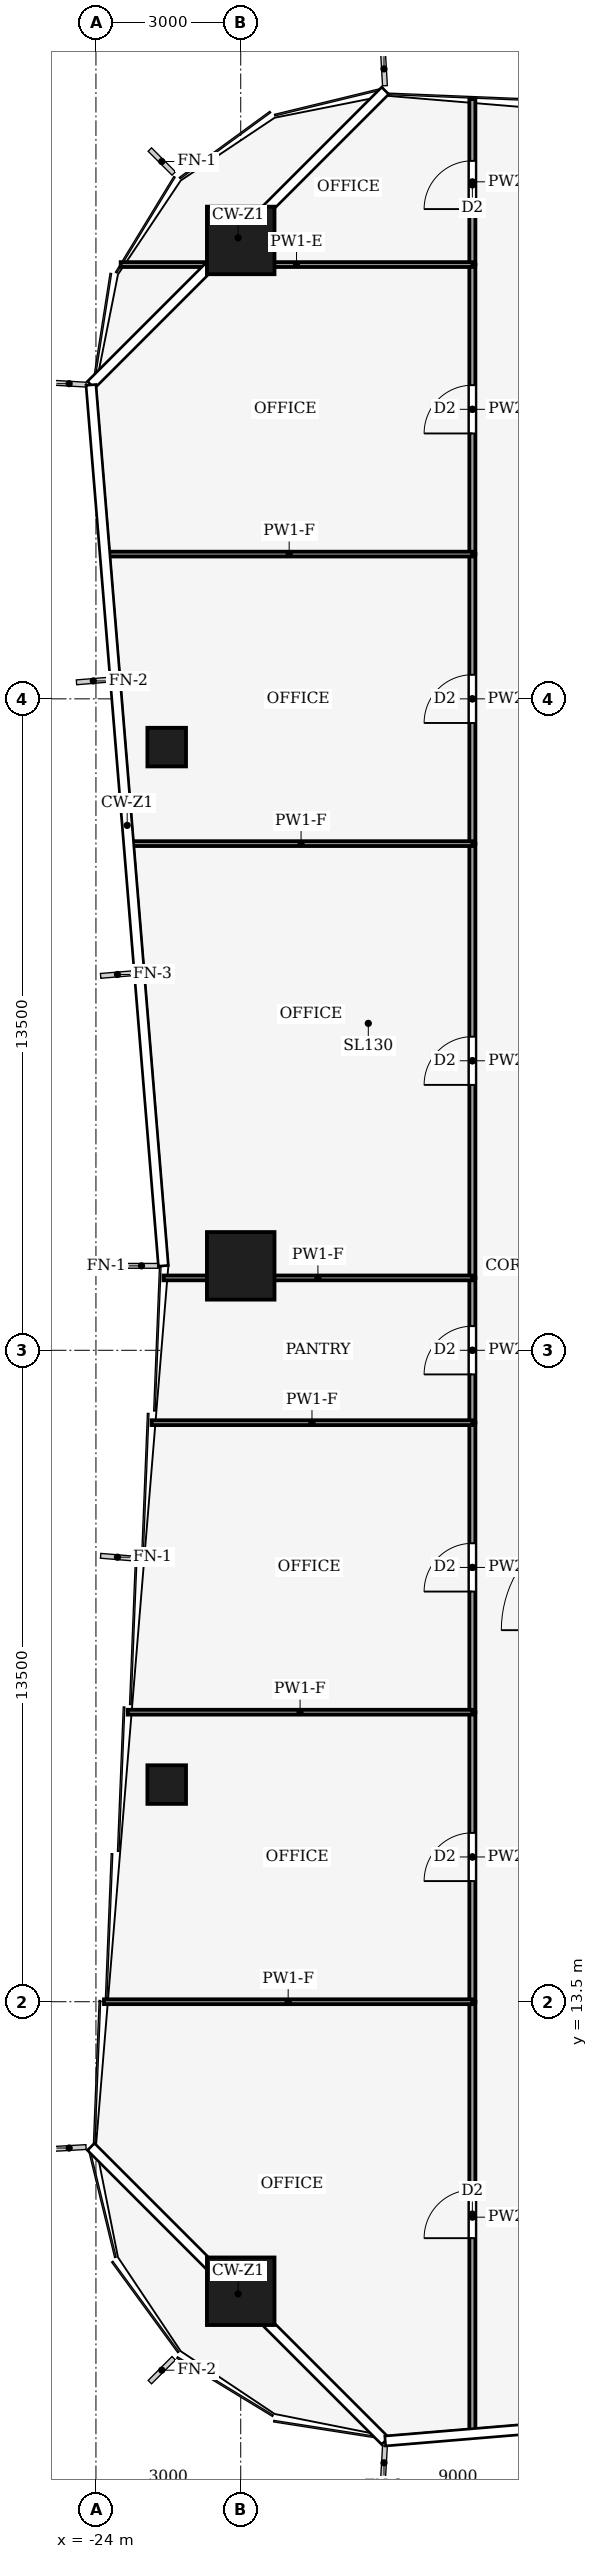
"""IFC4 building model, lengths in metres.
Left out: names, types, materials, properties, quantities, classifications, styles, units other than length and angle.
Written with IfcOpenShell. Run it as: python <this file> out.ifc"""

import sys

from ifc_helpers import new_model, si_unit, direction, frame, frame_2d, origin, origin_2d, place, context, subcontext, project, spatial, rectangle, hollow_rectangle, extrude, element, fill, save


model = new_model("IFC4")
c1 = context("Model", 3, precision=1e-05, world=origin(), true_north=direction((0.0, 1.0)))
c2 = subcontext(c1, "Body", "Model", "MODEL_VIEW")
j1 = project(units=[si_unit("LENGTHUNIT", "METRE"), si_unit("PLANEANGLEUNIT", "RADIAN")], contexts=[c1])
p1 = place(None, origin())
s1 = spatial("IfcSite", under=j1, at=p1, CompositionType="ELEMENT")
p2 = place(p1, origin())
s2 = spatial("IfcBuilding", under=s1, at=p2, CompositionType="ELEMENT")
p3 = place(p2, frame((0.0, 0.0, 70.0)))
s3 = spatial("IfcBuildingStorey", under=s2, at=p3, CompositionType="ELEMENT", Elevation=70.0)
for number, where, z_axis, x_axis in (
    (1, (-21.0, 50.0, 0.0), (0.0, 0.0, 1.0), (1.0, 0.0, 0.0)),
    (2, (-21.0, 7.5, 0.0), (0.0, 0.0, 1.0), (1.0, 0.0, 0.0)),
    (3, (-21.0, 28.75, 0.0), (0.0, 0.0, 1.0), (1.0, 0.0, 0.0)),
):
    element("IfcColumn", number, at=place(p3, frame(where, z_axis=z_axis, x_axis=x_axis)), inside=s3, PredefinedType="COLUMN", context=c2, shape_type="SweptSolid", body=[
        extrude(hollow_rectangle(XDim=1.4, YDim=1.4, WallThickness=0.08, at=origin_2d()), origin(), (0.0, 0.0, 1.0), 4.0),
    ])
for number, where, z_axis, x_axis in (
    (4, (-22.534, 18.0, 0.0), (0.0, 0.0, 1.0), (1.0, 0.0, 0.0)),
    (5, (-22.534, 39.5, 0.0), (0.0, 0.0, 1.0), (1.0, 0.0, 0.0)),
):
    element("IfcColumn", number, at=place(p3, frame(where, z_axis=z_axis, x_axis=x_axis)), inside=s3, PredefinedType="COLUMN", context=c2, shape_type="SweptSolid", body=[
        extrude(hollow_rectangle(XDim=0.8, YDim=0.8, WallThickness=0.04, at=origin_2d()), origin(), (0.0, 0.0, 1.0), 4.0),
    ])
p4 = place(p3, frame((-16.2, 4.57, 0.0), z_axis=(0.0, 0.0, 1.0), x_axis=(0.0, 1.0, 0.0)))
e6 = element("IfcWall", 6, at=p4, inside=s3, PredefinedType="PARTITIONING", context=c2, shape_type="SweptSolid", body=[
    extrude(rectangle(XDim=8.93, YDim=0.125, at=frame_2d((4.465, 0.0))), origin(), (0.0, 0.0, 1.0), 3.04),
])
p5 = place(p4, frame((4.03, 0.0, 0.0)))
e7 = element("IfcOpeningElement", 7, at=p5, cuts=e6, PredefinedType="OPENING", context=c2, shape_type="SweptSolid", body=[
    extrude(rectangle(XDim=1.0, YDim=2.1, at=frame_2d((0.5, 1.05))), frame((0.0, 0.073, 0.0), z_axis=(0.0, -1.0, 0.0), x_axis=(1.0, 0.0, 0.0)), (0.0, 0.0, 1.0), 0.145),
])
p6 = place(p3, frame((-16.2, 13.5, 0.0), z_axis=(0.0, 0.0, 1.0), x_axis=(0.0, 1.0, 0.0)))
e8 = element("IfcWall", 8, at=p6, inside=s3, PredefinedType="PARTITIONING", context=c2, shape_type="SweptSolid", body=[
    extrude(rectangle(XDim=6.0, YDim=0.125, at=frame_2d((3.0, 0.0))), origin(), (0.0, 0.0, 1.0), 3.14),
])
p7 = place(p6, frame((2.5, 0.0, 0.0)))
e9 = element("IfcOpeningElement", 9, at=p7, cuts=e8, PredefinedType="OPENING", context=c2, shape_type="SweptSolid", body=[
    extrude(rectangle(XDim=1.0, YDim=2.1, at=frame_2d((0.5, 1.05))), frame((0.0, 0.073, 0.0), z_axis=(0.0, -1.0, 0.0), x_axis=(1.0, 0.0, 0.0)), (0.0, 0.0, 1.0), 0.145),
])
p8 = place(p3, frame((-16.2, 19.5, 0.0), z_axis=(0.0, 0.0, 1.0), x_axis=(0.0, 1.0, 0.0)))
e10 = element("IfcWall", 10, at=p8, inside=s3, PredefinedType="PARTITIONING", context=c2, shape_type="SweptSolid", body=[
    extrude(rectangle(XDim=6.0, YDim=0.125, at=frame_2d((3.0, 0.0))), origin(), (0.0, 0.0, 1.0), 3.48),
])
p9 = place(p8, frame((2.5, 0.0, 0.0)))
e11 = element("IfcOpeningElement", 11, at=p9, cuts=e10, PredefinedType="OPENING", context=c2, shape_type="SweptSolid", body=[
    extrude(rectangle(XDim=1.0, YDim=2.1, at=frame_2d((0.5, 1.05))), frame((0.0, 0.073, 0.0), z_axis=(0.0, -1.0, 0.0), x_axis=(1.0, 0.0, 0.0)), (0.0, 0.0, 1.0), 0.145),
])
p10 = place(p3, frame((-16.2, 25.5, 0.0), z_axis=(0.0, 0.0, 1.0), x_axis=(0.0, 1.0, 0.0)))
e12 = element("IfcWall", 12, at=p10, inside=s3, PredefinedType="PARTITIONING", context=c2, shape_type="SweptSolid", body=[
    extrude(rectangle(XDim=3.0, YDim=0.125, at=frame_2d((1.5, 0.0))), origin(), (0.0, 0.0, 1.0), 3.48),
])
p11 = place(p10, frame((1.0, 0.0, 0.0)))
e13 = element("IfcOpeningElement", 13, at=p11, cuts=e12, PredefinedType="OPENING", context=c2, shape_type="SweptSolid", body=[
    extrude(rectangle(XDim=1.0, YDim=2.1, at=frame_2d((0.5, 1.05))), frame((0.0, 0.073, 0.0), z_axis=(0.0, -1.0, 0.0), x_axis=(1.0, 0.0, 0.0)), (0.0, 0.0, 1.0), 0.145),
])
p12 = place(p3, frame((-16.2, 28.5, 0.0), z_axis=(0.0, 0.0, 1.0), x_axis=(0.0, 1.0, 0.0)))
e14 = element("IfcWall", 14, at=p12, inside=s3, PredefinedType="PARTITIONING", context=c2, shape_type="SweptSolid", body=[
    extrude(rectangle(XDim=9.0, YDim=0.125, at=frame_2d((4.5, 0.0))), origin(), (0.0, 0.0, 1.0), 3.48),
])
p13 = place(p12, frame((4.0, 0.0, 0.0)))
e15 = element("IfcOpeningElement", 15, at=p13, cuts=e14, PredefinedType="OPENING", context=c2, shape_type="SweptSolid", body=[
    extrude(rectangle(XDim=1.0, YDim=2.1, at=frame_2d((0.5, 1.05))), frame((0.0, 0.073, 0.0), z_axis=(0.0, -1.0, 0.0), x_axis=(1.0, 0.0, 0.0)), (0.0, 0.0, 1.0), 0.145),
])
p14 = place(p3, frame((-16.2, 37.5, 0.0), z_axis=(0.0, 0.0, 1.0), x_axis=(0.0, 1.0, 0.0)))
e16 = element("IfcWall", 16, at=p14, inside=s3, PredefinedType="PARTITIONING", context=c2, shape_type="SweptSolid", body=[
    extrude(rectangle(XDim=6.0, YDim=0.125, at=frame_2d((3.0, 0.0))), origin(), (0.0, 0.0, 1.0), 3.14),
])
p15 = place(p14, frame((2.5, 0.0, 0.0)))
e17 = element("IfcOpeningElement", 17, at=p15, cuts=e16, PredefinedType="OPENING", context=c2, shape_type="SweptSolid", body=[
    extrude(rectangle(XDim=1.0, YDim=2.1, at=frame_2d((0.5, 1.05))), frame((0.0, 0.073, 0.0), z_axis=(0.0, -1.0, 0.0), x_axis=(1.0, 0.0, 0.0)), (0.0, 0.0, 1.0), 0.145),
])
p16 = place(p3, frame((-16.2, 43.5, 0.0), z_axis=(0.0, 0.0, 1.0), x_axis=(0.0, 1.0, 0.0)))
e18 = element("IfcWall", 18, at=p16, inside=s3, PredefinedType="PARTITIONING", context=c2, shape_type="SweptSolid", body=[
    extrude(rectangle(XDim=6.0, YDim=0.125, at=frame_2d((3.0, 0.0))), origin(), (0.0, 0.0, 1.0), 3.87),
])
p17 = place(p16, frame((2.5, 0.0, 0.0)))
e19 = element("IfcOpeningElement", 19, at=p17, cuts=e18, PredefinedType="OPENING", context=c2, shape_type="SweptSolid", body=[
    extrude(rectangle(XDim=1.0, YDim=2.1, at=frame_2d((0.5, 1.05))), frame((0.0, 0.073, 0.0), z_axis=(0.0, -1.0, 0.0), x_axis=(1.0, 0.0, 0.0)), (0.0, 0.0, 1.0), 0.145),
])
p18 = place(p3, frame((-16.2, 49.5, 0.0), z_axis=(0.0, 0.0, 1.0), x_axis=(0.0, 1.0, 0.0)))
e20 = element("IfcWall", 20, at=p18, inside=s3, PredefinedType="PARTITIONING", context=c2, shape_type="SweptSolid", body=[
    extrude(rectangle(XDim=3.43, YDim=0.125, at=frame_2d((1.715, 0.0))), origin(), (0.0, 0.0, 1.0), 3.04),
])
p19 = place(p18, frame((1.15, 0.0, 0.0)))
e21 = element("IfcOpeningElement", 21, at=p19, cuts=e20, PredefinedType="OPENING", context=c2, shape_type="SweptSolid", body=[
    extrude(rectangle(XDim=1.0, YDim=2.1, at=frame_2d((0.5, 1.05))), frame((0.0, 0.073, 0.0), z_axis=(0.0, -1.0, 0.0), x_axis=(1.0, 0.0, 0.0)), (0.0, 0.0, 1.0), 0.145),
])
p20 = place(p3, frame((-16.2, 13.5, 0.0), z_axis=(0.0, 0.0, 1.0), x_axis=(-1.0, 0.0, 0.0)))
e22 = element("IfcWall", 22, at=p20, inside=s3, PredefinedType="PARTITIONING", context=c2, shape_type="SweptSolid", body=[
    extrude(rectangle(XDim=7.634, YDim=0.1, at=frame_2d((3.817, 0.0))), origin(), (0.0, 0.0, 1.0), 3.04),
])
p21 = place(p3, frame((-16.2, 19.5, 0.0), z_axis=(0.0, 0.0, 1.0), x_axis=(-1.0, 0.0, 0.0)))
e23 = element("IfcWall", 23, at=p21, inside=s3, PredefinedType="PARTITIONING", context=c2, shape_type="SweptSolid", body=[
    extrude(rectangle(XDim=7.14, YDim=0.1, at=frame_2d((3.57, 0.0))), origin(), (0.0, 0.0, 1.0), 3.04),
])
p22 = place(p3, frame((-16.2, 25.5, 0.0), z_axis=(0.0, 0.0, 1.0), x_axis=(-1.0, 0.0, 0.0)))
e24 = element("IfcWall", 24, at=p22, inside=s3, PredefinedType="PARTITIONING", context=c2, shape_type="SweptSolid", body=[
    extrude(rectangle(XDim=6.647, YDim=0.1, at=frame_2d((3.324, 0.0))), origin(), (0.0, 0.0, 1.0), 3.04),
])
p23 = place(p3, frame((-16.2, 28.5, 0.0), z_axis=(0.0, 0.0, 1.0), x_axis=(-1.0, 0.0, 0.0)))
e25 = element("IfcWall", 25, at=p23, inside=s3, PredefinedType="PARTITIONING", context=c2, shape_type="SweptSolid", body=[
    extrude(rectangle(XDim=6.401, YDim=0.1, at=frame_2d((3.2, 0.0))), origin(), (0.0, 0.0, 1.0), 3.04),
])
p24 = place(p3, frame((-16.2, 37.5, 0.0), z_axis=(0.0, 0.0, 1.0), x_axis=(-1.0, 0.0, 0.0)))
e26 = element("IfcWall", 26, at=p24, inside=s3, PredefinedType="PARTITIONING", context=c2, shape_type="SweptSolid", body=[
    extrude(rectangle(XDim=7.099, YDim=0.1, at=frame_2d((3.55, 0.0))), origin(), (0.0, 0.0, 1.0), 3.04),
])
p25 = place(p3, frame((-16.2, 43.5, 0.0), z_axis=(0.0, 0.0, 1.0), x_axis=(-1.0, 0.0, 0.0)))
e27 = element("IfcWall", 27, at=p25, inside=s3, PredefinedType="PARTITIONING", context=c2, shape_type="SweptSolid", body=[
    extrude(rectangle(XDim=7.592, YDim=0.1, at=frame_2d((3.796, 0.0))), origin(), (0.0, 0.0, 1.0), 3.04),
])
p26 = place(p3, frame((-16.2, 49.5, 0.0), z_axis=(0.0, 0.0, 1.0), x_axis=(-1.0, 0.0, 0.0)))
e28 = element("IfcWall", 28, at=p26, inside=s3, PredefinedType="PARTITIONING", context=c2, shape_type="SweptSolid", body=[
    extrude(rectangle(XDim=7.287, YDim=0.1, at=frame_2d((3.644, 0.0))), origin(), (0.0, 0.0, 1.0), 3.34),
])
p27 = place(p5, origin())
e29 = element("IfcDoor", 29, at=p27, inside=s3, OperationType="SINGLE_SWING_RIGHT", PredefinedType="DOOR", context=c2, shape_type="SweptSolid", body=[
    extrude(rectangle(XDim=1.0, YDim=2.1, at=frame_2d((0.5, 1.05))), frame((0.0, 0.025, 0.0), z_axis=(0.0, -1.0, 0.0), x_axis=(1.0, 0.0, 0.0)), (0.0, 0.0, 1.0), 0.05),
])
fill(e7, e29)
p28 = place(p7, origin())
e30 = element("IfcDoor", 30, at=p28, inside=s3, OperationType="SINGLE_SWING_RIGHT", PredefinedType="DOOR", context=c2, shape_type="SweptSolid", body=[
    extrude(rectangle(XDim=1.0, YDim=2.1, at=frame_2d((0.5, 1.05))), frame((0.0, 0.025, 0.0), z_axis=(0.0, -1.0, 0.0), x_axis=(1.0, 0.0, 0.0)), (0.0, 0.0, 1.0), 0.05),
])
fill(e9, e30)
p29 = place(p9, origin())
e31 = element("IfcDoor", 31, at=p29, inside=s3, OperationType="SINGLE_SWING_LEFT", PredefinedType="DOOR", context=c2, shape_type="SweptSolid", body=[
    extrude(rectangle(XDim=1.0, YDim=2.1, at=frame_2d((0.5, 1.05))), frame((0.0, 0.025, 0.0), z_axis=(0.0, -1.0, 0.0), x_axis=(1.0, 0.0, 0.0)), (0.0, 0.0, 1.0), 0.05),
])
fill(e11, e31)
p30 = place(p11, origin())
e32 = element("IfcDoor", 32, at=p30, inside=s3, OperationType="SINGLE_SWING_RIGHT", PredefinedType="DOOR", context=c2, shape_type="SweptSolid", body=[
    extrude(rectangle(XDim=1.0, YDim=2.1, at=frame_2d((0.5, 1.05))), frame((0.0, 0.025, 0.0), z_axis=(0.0, -1.0, 0.0), x_axis=(1.0, 0.0, 0.0)), (0.0, 0.0, 1.0), 0.05),
])
fill(e13, e32)
p31 = place(p13, origin())
e33 = element("IfcDoor", 33, at=p31, inside=s3, OperationType="SINGLE_SWING_LEFT", PredefinedType="DOOR", context=c2, shape_type="SweptSolid", body=[
    extrude(rectangle(XDim=1.0, YDim=2.1, at=frame_2d((0.5, 1.05))), frame((0.0, 0.025, 0.0), z_axis=(0.0, -1.0, 0.0), x_axis=(1.0, 0.0, 0.0)), (0.0, 0.0, 1.0), 0.05),
])
fill(e15, e33)
p32 = place(p15, origin())
e34 = element("IfcDoor", 34, at=p32, inside=s3, OperationType="SINGLE_SWING_RIGHT", PredefinedType="DOOR", context=c2, shape_type="SweptSolid", body=[
    extrude(rectangle(XDim=1.0, YDim=2.1, at=frame_2d((0.5, 1.05))), frame((0.0, 0.025, 0.0), z_axis=(0.0, -1.0, 0.0), x_axis=(1.0, 0.0, 0.0)), (0.0, 0.0, 1.0), 0.05),
])
fill(e17, e34)
p33 = place(p17, origin())
e35 = element("IfcDoor", 35, at=p33, inside=s3, OperationType="SINGLE_SWING_LEFT", PredefinedType="DOOR", context=c2, shape_type="SweptSolid", body=[
    extrude(rectangle(XDim=1.0, YDim=2.1, at=frame_2d((0.5, 1.05))), frame((0.0, 0.025, 0.0), z_axis=(0.0, -1.0, 0.0), x_axis=(1.0, 0.0, 0.0)), (0.0, 0.0, 1.0), 0.05),
])
fill(e19, e35)
p34 = place(p19, origin())
e36 = element("IfcDoor", 36, at=p34, inside=s3, OperationType="SINGLE_SWING_LEFT", PredefinedType="DOOR", context=c2, shape_type="SweptSolid", body=[
    extrude(rectangle(XDim=1.0, YDim=2.1, at=frame_2d((0.5, 1.05))), frame((0.0, 0.025, 0.0), z_axis=(0.0, -1.0, 0.0), x_axis=(1.0, 0.0, 0.0)), (0.0, 0.0, 1.0), 0.05),
])
fill(e21, e36)
save(model, sys.argv[1])
